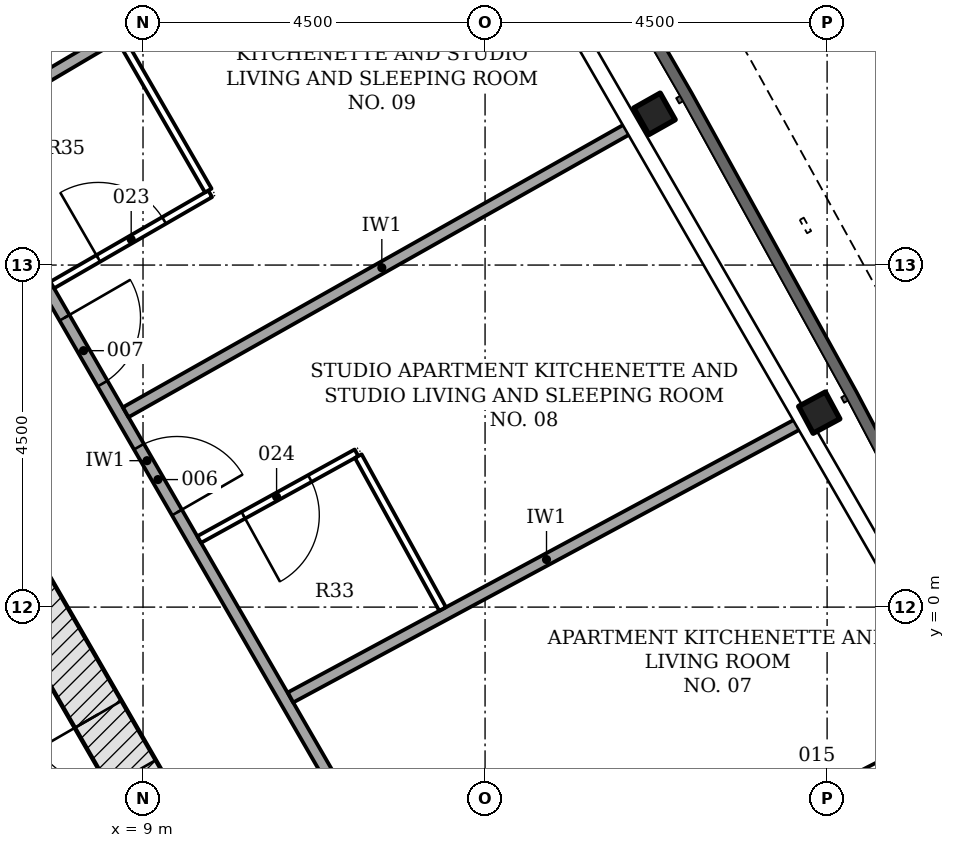
"""IFC4 building model, lengths in metres.
Left out: names, types, materials, properties, quantities, classifications, styles, units other than length and angle.
Written with IfcOpenShell. Run it as: python <this file> out.ifc"""

import sys

from ifc_helpers import new_model, si_unit, direction, frame, frame_2d, origin, origin_2d, place, context, subcontext, project, spatial, rectangle, i_section, extrude, element, fill, save


model = new_model("IFC4")
c1 = context("Model", 3, precision=1e-05, world=origin(), true_north=direction((0.0, 1.0)))
c2 = subcontext(c1, "Body", "Model", "MODEL_VIEW")
j1 = project(units=[si_unit("LENGTHUNIT", "METRE"), si_unit("PLANEANGLEUNIT", "RADIAN")], contexts=[c1])
p1 = place(None, origin())
s1 = spatial("IfcSite", under=j1, at=p1, CompositionType="ELEMENT")
p2 = place(p1, origin())
s2 = spatial("IfcBuilding", under=s1, at=p2, CompositionType="ELEMENT")
p3 = place(p2, frame((0.0, 0.0, 98.7)))
s3 = spatial("IfcBuildingStorey", under=s2, at=p3, CompositionType="ELEMENT", Elevation=98.7)
p4 = place(p3, frame((10.311, -4.703, -0.2), z_axis=(0.0, 0.0, 1.0), x_axis=(-0.500001446645, 0.866024568562, 0.0)))
e1 = element("IfcWall", 1, at=p4, inside=s3, PredefinedType="SHEAR", context=c2, shape_type="SweptSolid", body=[
    extrude(rectangle(XDim=18.458, YDim=0.7, at=frame_2d((9.229, 0.0))), origin(), (0.0, 0.0, 1.0), 3.6),
])
p5 = place(p4, frame((6.5, 0.0, 0.2)))
e2 = element("IfcOpeningElement", 2, at=p5, cuts=e1, PredefinedType="OPENING", context=c2, shape_type="SweptSolid", body=[
    extrude(rectangle(XDim=1.0, YDim=2.1, at=frame_2d((0.5, 1.05))), frame((0.0, 0.36, 0.0), z_axis=(0.0, -1.0, 0.0), x_axis=(1.0, 0.0, 0.0)), (0.0, 0.0, 1.0), 0.72),
])
p6 = place(p4, frame((2.902, 0.0, 0.2)))
e3 = element("IfcOpeningElement", 3, at=p6, cuts=e1, PredefinedType="OPENING", context=c2, shape_type="SweptSolid", body=[
    extrude(rectangle(XDim=0.9, YDim=2.1, at=frame_2d((0.45, 1.05))), frame((0.0, 0.36, 0.0), z_axis=(0.0, -1.0, 0.0), x_axis=(1.0, 0.0, 0.0)), (0.0, 0.0, 1.0), 0.72),
])
p7 = place(p4, frame((8.75, 0.0, 0.2)))
e4 = element("IfcOpeningElement", 4, at=p7, cuts=e1, PredefinedType="OPENING", context=c2, shape_type="SweptSolid", body=[
    extrude(rectangle(XDim=1.0, YDim=2.1, at=frame_2d((0.5, 1.05))), frame((0.0, 0.36, 0.0), z_axis=(0.0, -1.0, 0.0), x_axis=(1.0, 0.0, 0.0)), (0.0, 0.0, 1.0), 0.72),
])
p8 = place(p4, frame((13.977, 0.0, 0.2)))
e5 = element("IfcOpeningElement", 5, at=p8, cuts=e1, PredefinedType="OPENING", context=c2, shape_type="SweptSolid", body=[
    extrude(rectangle(XDim=0.9, YDim=2.1, at=frame_2d((0.45, 1.05))), frame((0.0, 0.36, 0.0), z_axis=(0.0, -1.0, 0.0), x_axis=(1.0, 0.0, 0.0)), (0.0, 0.0, 1.0), 0.72),
])
for number, where, z_axis, x_axis in (
    (6, (17.897, 2.558, -0.2), (0.0, 0.0, 1.0), (-0.474, 0.88, 0.0)),
    (7, (15.729, 6.49, -0.2), (0.0, 0.0, 1.0), (-0.491, 0.871, 0.0)),
):
    element("IfcColumn", number, at=place(p3, frame(where, z_axis=z_axis, x_axis=x_axis)), inside=s3, PredefinedType="COLUMN", context=c2, shape_type="SweptSolid", body=[
        extrude(i_section(OverallWidth=0.401, OverallDepth=0.399, WebThickness=0.025, FlangeThickness=0.04, FilletRadius=0.015, at=origin_2d()), origin(), (0.0, 0.0, 1.0), 3.6),
    ])
p9 = place(p3, frame((5.289, 8.446, 0.0), z_axis=(0.0, 0.0, 1.0), x_axis=(0.499996620721, -0.866027354803, 0.0)))
e8 = element("IfcWall", 8, at=p9, inside=s3, PredefinedType="PARTITIONING", context=c2, shape_type="SweptSolid", body=[
    extrude(rectangle(XDim=15.057, YDim=0.15, at=frame_2d((7.528, 0.0))), origin(), (0.0, 0.0, 1.0), 2.778),
])
p10 = place(p9, frame((12.566, 0.0, 0.0)))
e9 = element("IfcOpeningElement", 9, at=p10, cuts=e8, PredefinedType="OPENING", context=c2, shape_type="SweptSolid", body=[
    extrude(rectangle(XDim=1.0, YDim=2.1, at=frame_2d((0.5, 1.05))), frame((0.0, 0.085, 0.0), z_axis=(0.0, -1.0, 0.0), x_axis=(1.0, 0.0, 0.0)), (0.0, 0.0, 1.0), 0.17),
])
p11 = place(p9, frame((7.316, 0.0, 0.0)))
e10 = element("IfcOpeningElement", 10, at=p11, cuts=e8, PredefinedType="OPENING", context=c2, shape_type="SweptSolid", body=[
    extrude(rectangle(XDim=1.0, YDim=2.1, at=frame_2d((0.5, 1.05))), frame((0.0, 0.085, 0.0), z_axis=(0.0, -1.0, 0.0), x_axis=(1.0, 0.0, 0.0)), (0.0, 0.0, 1.0), 0.17),
])
p12 = place(p9, frame((5.357, 0.0, 0.0)))
e11 = element("IfcOpeningElement", 11, at=p12, cuts=e8, PredefinedType="OPENING", context=c2, shape_type="SweptSolid", body=[
    extrude(rectangle(XDim=1.0, YDim=2.1, at=frame_2d((0.5, 1.05))), frame((0.0, 0.085, 0.0), z_axis=(0.0, -1.0, 0.0), x_axis=(1.0, 0.0, 0.0)), (0.0, 0.0, 1.0), 0.17),
])
p13 = place(p3, frame((15.511, 6.366, 0.0), z_axis=(0.0, 0.0, 1.0), x_axis=(-0.870902291502, -0.491456202175, 0.0)))
e12 = element("IfcWall", 12, at=p13, inside=s3, PredefinedType="PARTITIONING", context=c2, shape_type="SweptSolid", body=[
    extrude(rectangle(XDim=7.738, YDim=0.15, at=frame_2d((3.869, 0.0))), origin(), (0.0, 0.0, 1.0), 2.778),
])
p14 = place(p3, frame((13.269, 10.25, 0.0), z_axis=(0.0, 0.0, 1.0), x_axis=(-0.861057776749, -0.508507133775, 0.0)))
e13 = element("IfcWall", 13, at=p14, inside=s3, PredefinedType="PARTITIONING", context=c2, shape_type="SweptSolid", body=[
    extrude(rectangle(XDim=7.738, YDim=0.15, at=frame_2d((3.869, 0.0))), origin(), (0.0, 0.0, 1.0), 2.778),
])
p15 = place(p3, frame((17.677, 2.44, 0.0), z_axis=(0.0, 0.0, 1.0), x_axis=(-0.880400392736, -0.47423111293, 0.0)))
e14 = element("IfcWall", 14, at=p15, inside=s3, PredefinedType="PARTITIONING", context=c2, shape_type="SweptSolid", body=[
    extrude(rectangle(XDim=7.651, YDim=0.15, at=frame_2d((3.826, 0.0))), origin(), (0.0, 0.0, 1.0), 2.778),
])
p16 = place(p3, frame((19.764, -1.529, 0.0), z_axis=(0.0, 0.0, 1.0), x_axis=(-0.889562755555, -0.456812985728, 0.0)))
e15 = element("IfcWall", 15, at=p16, inside=s3, PredefinedType="PARTITIONING", context=c2, shape_type="SweptSolid", body=[
    extrude(rectangle(XDim=8.177, YDim=0.1, at=frame_2d((4.089, 0.0))), origin(), (0.0, 0.0, 1.0), 2.778),
])
p17 = place(p16, frame((5.742, 0.0, 0.0)))
e16 = element("IfcOpeningElement", 16, at=p17, cuts=e15, PredefinedType="OPENING", context=c2, shape_type="SweptSolid", body=[
    extrude(rectangle(XDim=1.0, YDim=2.1, at=frame_2d((0.5, 1.05))), frame((0.0, 0.06, 0.0), z_axis=(0.0, -1.0, 0.0), x_axis=(1.0, 0.0, 0.0)), (0.0, 0.0, 1.0), 0.12),
])
p18 = place(p16, frame((1.635, 0.0, 0.0)))
e17 = element("IfcOpeningElement", 17, at=p18, cuts=e15, PredefinedType="OPENING", context=c2, shape_type="SweptSolid", body=[
    extrude(rectangle(XDim=1.0, YDim=2.1, at=frame_2d((0.5, 1.05))), frame((0.0, 0.06, 0.0), z_axis=(0.0, -1.0, 0.0), x_axis=(1.0, 0.0, 0.0)), (0.0, 0.0, 1.0), 0.12),
])
p19 = place(p3, frame((7.805, 4.237, 0.0), z_axis=(0.0, 0.0, 1.0), x_axis=(0.866006032174, 0.500033551112, 0.0)))
e18 = element("IfcWall", 18, at=p19, inside=s3, PredefinedType="PARTITIONING", context=c2, shape_type="SweptSolid", body=[
    extrude(rectangle(XDim=2.4, YDim=0.1, at=frame_2d((1.2, 0.0))), origin(), (0.0, 0.0, 1.0), 3.4),
])
p20 = place(p19, frame((0.7, 0.0, 0.0)))
e19 = element("IfcOpeningElement", 19, at=p20, cuts=e18, PredefinedType="OPENING", context=c2, shape_type="SweptSolid", body=[
    extrude(rectangle(XDim=1.0, YDim=2.1, at=frame_2d((0.5, 1.05))), frame((0.0, 0.06, 0.0), z_axis=(0.0, -1.0, 0.0), x_axis=(1.0, 0.0, 0.0)), (0.0, 0.0, 1.0), 0.12),
])
p21 = place(p3, frame((11.808, 2.03, 0.0), z_axis=(0.0, 0.0, 1.0), x_axis=(-0.875678647011, -0.482894302275, 0.0)))
e20 = element("IfcWall", 20, at=p21, inside=s3, PredefinedType="PARTITIONING", context=c2, shape_type="SweptSolid", body=[
    extrude(rectangle(XDim=2.363, YDim=0.1, at=frame_2d((1.181, 0.0))), origin(), (0.0, 0.0, 1.0), 3.4),
])
p22 = place(p21, frame((0.7, 0.0, 0.0)))
e21 = element("IfcOpeningElement", 21, at=p22, cuts=e20, PredefinedType="OPENING", context=c2, shape_type="SweptSolid", body=[
    extrude(rectangle(XDim=1.0, YDim=2.1, at=frame_2d((0.5, 1.05))), frame((0.0, 0.06, 0.0), z_axis=(0.0, -1.0, 0.0), x_axis=(1.0, 0.0, 0.0)), (0.0, 0.0, 1.0), 0.12),
])
p23 = place(p3, frame((12.941, -0.025, 0.0), z_axis=(0.0, 0.0, 1.0), x_axis=(-0.482860975889, 0.875697024069, 0.0)))
e22 = element("IfcWall", 22, at=p23, inside=s3, PredefinedType="PARTITIONING", context=c2, shape_type="SweptSolid", body=[
    extrude(rectangle(XDim=2.297, YDim=0.1, at=frame_2d((1.148, 0.0))), origin(), (0.0, 0.0, 1.0), 2.778),
])
p24 = place(p3, frame((8.71, 7.47, 0.0), z_axis=(0.0, 0.0, 1.0), x_axis=(0.499980071345, -0.866036909293, 0.0)))
e23 = element("IfcWall", 23, at=p24, inside=s3, PredefinedType="PARTITIONING", context=c2, shape_type="SweptSolid", body=[
    extrude(rectangle(XDim=2.297, YDim=0.1, at=frame_2d((1.148, 0.0))), origin(), (0.0, 0.0, 1.0), 2.778),
])
p25 = place(p6, origin())
e24 = element("IfcDoor", 24, at=p25, inside=s3, OperationType="SINGLE_SWING_RIGHT", PredefinedType="DOOR", context=c2, shape_type="SweptSolid", body=[
    extrude(rectangle(XDim=0.9, YDim=2.1, at=frame_2d((0.45, 1.05))), frame((0.0, 0.075, 0.0), z_axis=(0.0, -1.0, 0.0), x_axis=(1.0, 0.0, 0.0)), (0.0, 0.0, 1.0), 0.15),
])
fill(e3, e24)
p26 = place(p11, origin())
e25 = element("IfcDoor", 25, at=p26, inside=s3, OperationType="SINGLE_SWING_RIGHT", PredefinedType="DOOR", context=c2, shape_type="SweptSolid", body=[
    extrude(rectangle(XDim=1.0, YDim=2.1, at=frame_2d((0.5, 1.05))), frame((0.0, 0.025, 0.0), z_axis=(0.0, -1.0, 0.0), x_axis=(1.0, 0.0, 0.0)), (0.0, 0.0, 1.0), 0.05),
])
fill(e10, e25)
p27 = place(p12, origin())
e26 = element("IfcDoor", 26, at=p27, inside=s3, OperationType="SINGLE_SWING_LEFT", PredefinedType="DOOR", context=c2, shape_type="SweptSolid", body=[
    extrude(rectangle(XDim=1.0, YDim=2.1, at=frame_2d((0.5, 1.05))), frame((0.0, 0.025, 0.0), z_axis=(0.0, -1.0, 0.0), x_axis=(1.0, 0.0, 0.0)), (0.0, 0.0, 1.0), 0.05),
])
fill(e11, e26)
p28 = place(p20, origin())
e27 = element("IfcDoor", 27, at=p28, inside=s3, OperationType="SINGLE_SWING_LEFT", PredefinedType="DOOR", context=c2, shape_type="SweptSolid", body=[
    extrude(rectangle(XDim=1.0, YDim=2.1, at=frame_2d((0.5, 1.05))), frame((0.0, 0.025, 0.0), z_axis=(0.0, -1.0, 0.0), x_axis=(1.0, 0.0, 0.0)), (0.0, 0.0, 1.0), 0.05),
])
fill(e19, e27)
p29 = place(p22, origin())
e28 = element("IfcDoor", 28, at=p29, inside=s3, OperationType="SINGLE_SWING_RIGHT", PredefinedType="DOOR", context=c2, shape_type="SweptSolid", body=[
    extrude(rectangle(XDim=1.0, YDim=2.1, at=frame_2d((0.5, 1.05))), frame((0.0, 0.025, 0.0), z_axis=(0.0, -1.0, 0.0), x_axis=(1.0, 0.0, 0.0)), (0.0, 0.0, 1.0), 0.05),
])
fill(e21, e28)
save(model, sys.argv[1])
